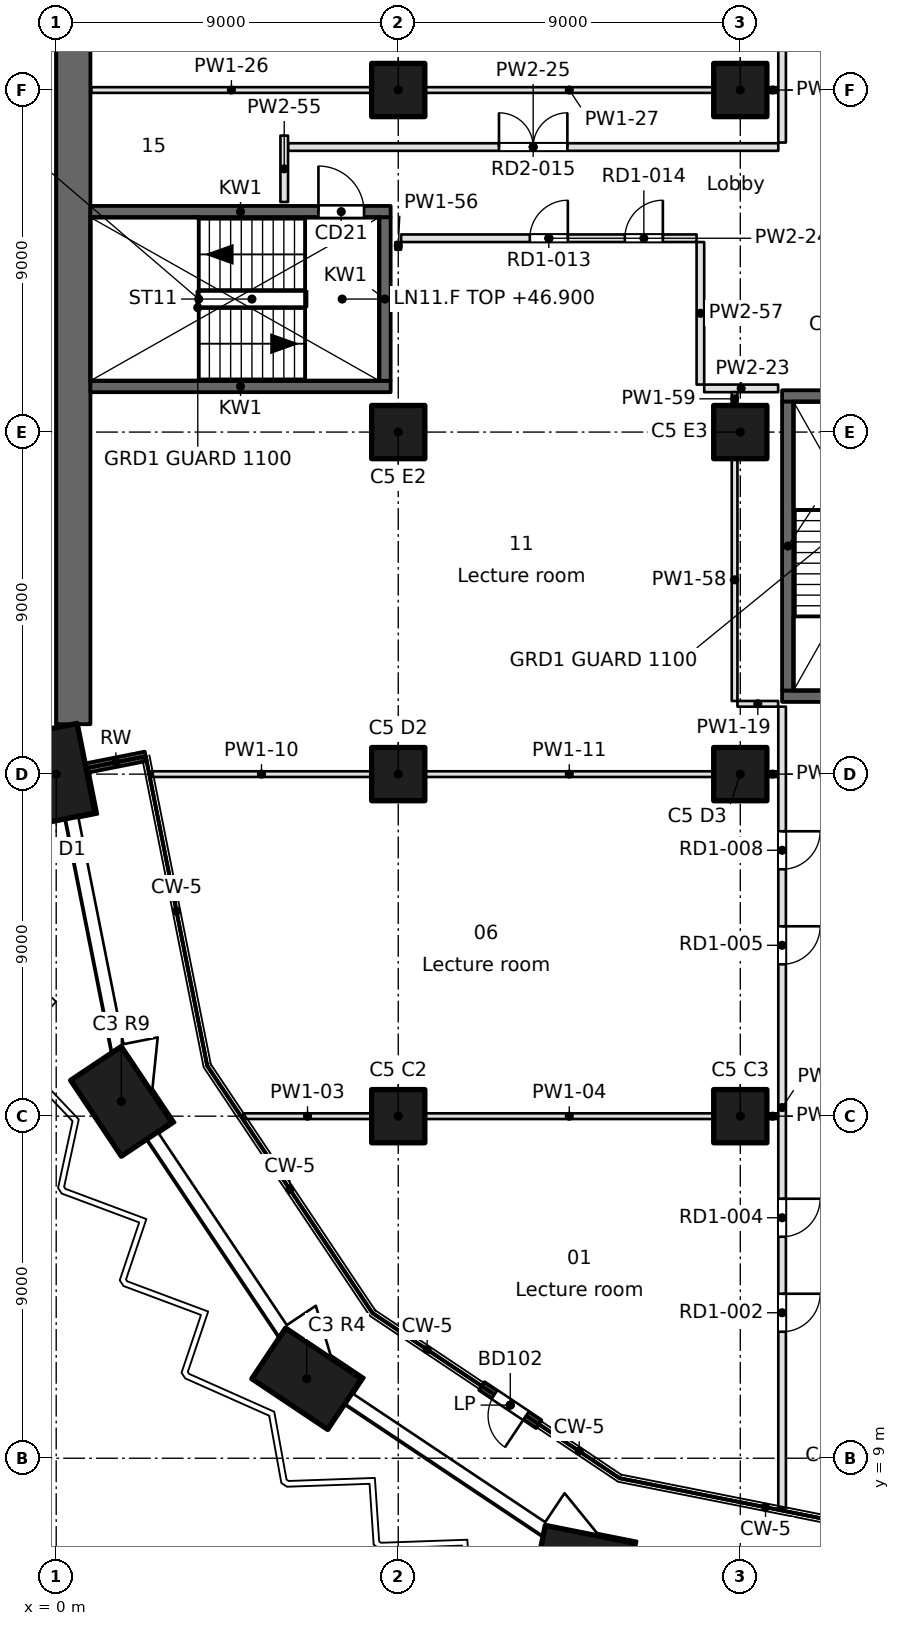
"""IFC4 building model, lengths in metres.
Left out: names, types, materials, properties, quantities, classifications, styles, units other than length and angle.
Written with IfcOpenShell. Run it as: python <this file> out.ifc"""

import sys

from ifc_helpers import new_model, si_unit, direction, frame, frame_2d, origin, origin_2d, place, context, subcontext, project, spatial, rectangle, extrude, element, fill, save


model = new_model("IFC4")
c1 = context("Model", 3, precision=1e-05, world=origin(), true_north=direction((0.0, 1.0)))
c2 = subcontext(c1, "Body", "Model", "MODEL_VIEW")
j1 = project(units=[si_unit("LENGTHUNIT", "METRE"), si_unit("PLANEANGLEUNIT", "RADIAN")], contexts=[c1])
p1 = place(None, origin())
s1 = spatial("IfcSite", under=j1, at=p1, CompositionType="ELEMENT")
p2 = place(p1, origin())
s2 = spatial("IfcBuilding", under=s1, at=p2, CompositionType="ELEMENT")
p3 = place(p2, frame((0.0, 0.0, 46.9)))
s3 = spatial("IfcBuildingStorey", under=s2, at=p3, CompositionType="ELEMENT", Elevation=46.9)
for number, where, z_axis, x_axis in (
    (1, (13.89, 6.213, 0.0), (0.0, 0.0, 1.0), (-0.981, 0.195, 0.0)),
    (2, (6.59, 11.09, 0.0), (0.0, 0.0, 1.0), (-0.831, 0.556, 0.0)),
    (3, (1.713, 18.39, 0.0), (0.0, 0.0, 1.0), (-0.556, 0.831, 0.0)),
    (4, (0.0, 27.0, 0.0), (0.0, 0.0, 1.0), (-0.195, 0.981, 0.0)),
):
    element("IfcColumn", number, at=place(p3, frame(where, z_axis=z_axis, x_axis=x_axis)), inside=s3, PredefinedType="COLUMN", context=c2, shape_type="SweptSolid", body=[
        extrude(rectangle(XDim=2.4, YDim=1.6, at=origin_2d()), origin(), (0.0, 0.0, 1.0), 3.7),
    ])
for number, where, z_axis, x_axis in (
    (5, (9.0, 18.0, 0.0), (0.0, 0.0, 1.0), (1.0, 0.0, 0.0)),
    (6, (9.0, 27.0, 0.0), (0.0, 0.0, 1.0), (1.0, 0.0, 0.0)),
    (7, (9.0, 36.0, 0.0), (0.0, 0.0, 1.0), (1.0, 0.0, 0.0)),
    (8, (9.0, 45.0, 0.0), (0.0, 0.0, 1.0), (1.0, 0.0, 0.0)),
    (9, (18.0, 18.0, 0.0), (0.0, 0.0, 1.0), (1.0, 0.0, 0.0)),
    (10, (18.0, 27.0, 0.0), (0.0, 0.0, 1.0), (1.0, 0.0, 0.0)),
    (11, (18.0, 36.0, 0.0), (0.0, 0.0, 1.0), (1.0, 0.0, 0.0)),
    (12, (18.0, 45.0, 0.0), (0.0, 0.0, 1.0), (1.0, 0.0, 0.0)),
):
    element("IfcColumn", number, at=place(p3, frame(where, z_axis=z_axis, x_axis=x_axis)), inside=s3, PredefinedType="COLUMN", context=c2, shape_type="SweptSolid", body=[
        extrude(rectangle(XDim=1.4, YDim=1.4, at=origin_2d()), origin(), (0.0, 0.0, 1.0), 3.7),
    ])
p4 = place(p3, frame((0.45, 94.5, 0.0), z_axis=(0.0, 0.0, 1.0), x_axis=(0.0, -1.0, 0.0)))
e13 = element("IfcWall", 13, at=p4, inside=s3, PredefinedType="SHEAR", context=c2, shape_type="SweptSolid", body=[
    extrude(rectangle(XDim=66.187, YDim=0.9, at=frame_2d((33.094, 0.0))), origin(), (0.0, 0.0, 1.0), 3.7),
])
p5 = place(p3, frame((0.784, 27.157, 0.0), z_axis=(0.0, 0.0, 1.0), x_axis=(0.980826234823, 0.19488431718, 0.0)))
e14 = element("IfcWall", 14, at=p5, inside=s3, PredefinedType="SOLIDWALL", context=c2, shape_type="SweptSolid", body=[
    extrude(rectangle(XDim=1.601, YDim=0.25, at=frame_2d((0.801, 0.0))), origin(), (0.0, 0.0, 1.0), 3.3),
])
p6 = place(p3, frame((11.2, 10.898, 0.0), z_axis=(0.0, 0.0, 1.0), x_axis=(0.83146554274, -0.555576323502, 0.0)))
e15 = element("IfcWall", 15, at=p6, inside=s3, PredefinedType="SOLIDWALL", context=c2, shape_type="SweptSolid", body=[
    extrude(rectangle(XDim=1.8, YDim=0.25, at=frame_2d((0.9, 0.0))), origin(), (0.0, 0.0, 1.0), 3.3),
])
p7 = place(p6, frame((0.4, 0.0, 0.0)))
e16 = element("IfcOpeningElement", 16, at=p7, cuts=e15, PredefinedType="OPENING", context=c2, shape_type="SweptSolid", body=[
    extrude(rectangle(XDim=1.0, YDim=2.1, at=frame_2d((0.5, 1.05))), frame((0.0, 0.125, 0.0), z_axis=(0.0, -1.0, 0.0), x_axis=(1.0, 0.0, 0.0)), (0.0, 0.0, 1.0), 0.25),
])
for number, where, z_axis, x_axis in (
    (17, (19.1, 29.05, -0.4), (0.0, 0.0, 1.0), (1.0, 0.0, 0.0)),
    (18, (19.1, 36.95, -0.4), (0.0, 0.0, 1.0), (1.0, 0.0, 0.0)),
):
    element("IfcWall", number, at=place(p3, frame(where, z_axis=z_axis, x_axis=x_axis)), inside=s3, PredefinedType="SOLIDWALL", context=c2, shape_type="SweptSolid", body=[
        extrude(rectangle(XDim=4.9, YDim=0.3, at=frame_2d((2.45, 0.0))), origin(), (0.0, 0.0, 1.0), 3.7),
    ])
p8 = place(p3, frame((0.9, 37.2, -0.4), z_axis=(0.0, 0.0, 1.0), x_axis=(1.0, 0.0, 0.0)))
e19 = element("IfcWall", 19, at=p8, inside=s3, PredefinedType="SOLIDWALL", context=c2, shape_type="SweptSolid", body=[
    extrude(rectangle(XDim=7.9, YDim=0.3, at=frame_2d((3.95, 0.0))), origin(), (0.0, 0.0, 1.0), 3.7),
])
p9 = place(p3, frame((0.9, 41.8, -0.4), z_axis=(0.0, 0.0, 1.0), x_axis=(1.0, 0.0, 0.0)))
e20 = element("IfcWall", 20, at=p9, inside=s3, PredefinedType="SOLIDWALL", context=c2, shape_type="SweptSolid", body=[
    extrude(rectangle(XDim=7.9, YDim=0.3, at=frame_2d((3.95, 0.0))), origin(), (0.0, 0.0, 1.0), 3.7),
])
p10 = place(p9, frame((6.0, 0.0, 0.4)))
e21 = element("IfcOpeningElement", 21, at=p10, cuts=e20, PredefinedType="OPENING", context=c2, shape_type="SweptSolid", body=[
    extrude(rectangle(XDim=1.2, YDim=2.1, at=frame_2d((0.6, 1.05))), frame((0.0, 0.15, 0.0), z_axis=(0.0, -1.0, 0.0), x_axis=(1.0, 0.0, 0.0)), (0.0, 0.0, 1.0), 0.3),
])
p11 = place(p3, frame((8.65, 37.35, -0.4), z_axis=(0.0, 0.0, 1.0), x_axis=(0.0, 1.0, 0.0)))
e22 = element("IfcWall", 22, at=p11, inside=s3, PredefinedType="SOLIDWALL", context=c2, shape_type="SweptSolid", body=[
    extrude(rectangle(XDim=4.3, YDim=0.3, at=frame_2d((2.15, 0.0))), origin(), (0.0, 0.0, 1.0), 3.7),
])
p12 = place(p3, frame((19.25, 29.2, -0.4), z_axis=(0.0, 0.0, 1.0), x_axis=(0.0, 1.0, 0.0)))
e23 = element("IfcWall", 23, at=p12, inside=s3, PredefinedType="SOLIDWALL", context=c2, shape_type="SweptSolid", body=[
    extrude(rectangle(XDim=7.6, YDim=0.3, at=frame_2d((3.8, 0.0))), origin(), (0.0, 0.0, 1.0), 3.7),
])
p13 = place(p3, frame((4.926, 18.0, 0.0), z_axis=(0.0, 0.0, 1.0), x_axis=(1.0, 0.0, 0.0)))
e24 = element("IfcWall", 24, at=p13, inside=s3, PredefinedType="PARTITIONING", context=c2, shape_type="SweptSolid", body=[
    extrude(rectangle(XDim=3.375, YDim=0.15, at=frame_2d((1.687, 0.0))), origin(), (0.0, 0.0, 1.0), 3.3),
])
p14 = place(p3, frame((9.7, 18.0, 0.0), z_axis=(0.0, 0.0, 1.0), x_axis=(1.0, 0.0, 0.0)))
e25 = element("IfcWall", 25, at=p14, inside=s3, PredefinedType="PARTITIONING", context=c2, shape_type="SweptSolid", body=[
    extrude(rectangle(XDim=7.6, YDim=0.15, at=frame_2d((3.8, 0.0))), origin(), (0.0, 0.0, 1.0), 3.3),
])
p15 = place(p3, frame((18.7, 18.0, 0.0), z_axis=(0.0, 0.0, 1.0), x_axis=(1.0, 0.0, 0.0)))
e26 = element("IfcWall", 26, at=p15, inside=s3, PredefinedType="PARTITIONING", context=c2, shape_type="SweptSolid", body=[
    extrude(rectangle(XDim=0.3, YDim=0.15, at=frame_2d((0.15, 0.0))), origin(), (0.0, 0.0, 1.0), 3.3),
])
p16 = place(p3, frame((2.503, 27.0, 0.0), z_axis=(0.0, 0.0, 1.0), x_axis=(1.0, 0.0, 0.0)))
e27 = element("IfcWall", 27, at=p16, inside=s3, PredefinedType="PARTITIONING", context=c2, shape_type="SweptSolid", body=[
    extrude(rectangle(XDim=5.797, YDim=0.15, at=frame_2d((2.898, 0.0))), origin(), (0.0, 0.0, 1.0), 3.3),
])
p17 = place(p3, frame((9.7, 27.0, 0.0), z_axis=(0.0, 0.0, 1.0), x_axis=(1.0, 0.0, 0.0)))
e28 = element("IfcWall", 28, at=p17, inside=s3, PredefinedType="PARTITIONING", context=c2, shape_type="SweptSolid", body=[
    extrude(rectangle(XDim=7.6, YDim=0.15, at=frame_2d((3.8, 0.0))), origin(), (0.0, 0.0, 1.0), 3.3),
])
p18 = place(p3, frame((18.7, 27.0, 0.0), z_axis=(0.0, 0.0, 1.0), x_axis=(1.0, 0.0, 0.0)))
e29 = element("IfcWall", 29, at=p18, inside=s3, PredefinedType="PARTITIONING", context=c2, shape_type="SweptSolid", body=[
    extrude(rectangle(XDim=0.3, YDim=0.15, at=frame_2d((0.15, 0.0))), origin(), (0.0, 0.0, 1.0), 3.3),
])
p19 = place(p3, frame((17.925, 28.85, 0.0), z_axis=(0.0, 0.0, 1.0), x_axis=(1.0, 0.0, 0.0)))
e30 = element("IfcWall", 30, at=p19, inside=s3, PredefinedType="PARTITIONING", context=c2, shape_type="SweptSolid", body=[
    extrude(rectangle(XDim=1.071, YDim=0.15, at=frame_2d((0.536, 0.0))), origin(), (0.0, 0.0, 1.0), 3.3),
])
p20 = place(p3, frame((18.996, 37.15, 0.0), z_axis=(0.0, 0.0, 1.0), x_axis=(-1.0, 0.0, 0.0)))
e31 = element("IfcWall", 31, at=p20, inside=s3, PredefinedType="PARTITIONING", context=c2, shape_type="SweptSolid", body=[
    extrude(rectangle(XDim=1.946, YDim=0.2, at=frame_2d((0.973, 0.0))), origin(), (0.0, 0.0, 1.0), 3.3),
])
p21 = place(p3, frame((16.85, 41.1, 0.0), z_axis=(0.0, 0.0, 1.0), x_axis=(-1.0, 0.0, 0.0)))
e32 = element("IfcWall", 32, at=p21, inside=s3, PredefinedType="PARTITIONING", context=c2, shape_type="SweptSolid", body=[
    extrude(rectangle(XDim=7.775, YDim=0.2, at=frame_2d((3.888, 0.0))), origin(), (0.0, 0.0, 1.0), 3.3),
])
p22 = place(p21, frame((3.387, 0.0, 0.0)))
e33 = element("IfcOpeningElement", 33, at=p22, cuts=e32, PredefinedType="OPENING", context=c2, shape_type="SweptSolid", body=[
    extrude(rectangle(XDim=1.0, YDim=2.1, at=frame_2d((0.5, 1.05))), frame((0.0, 0.1, 0.0), z_axis=(0.0, -1.0, 0.0), x_axis=(1.0, 0.0, 0.0)), (0.0, 0.0, 1.0), 0.2),
])
p23 = place(p21, frame((0.887, 0.0, 0.0)))
e34 = element("IfcOpeningElement", 34, at=p23, cuts=e32, PredefinedType="OPENING", context=c2, shape_type="SweptSolid", body=[
    extrude(rectangle(XDim=1.0, YDim=2.1, at=frame_2d((0.5, 1.05))), frame((0.0, 0.1, 0.0), z_axis=(0.0, -1.0, 0.0), x_axis=(1.0, 0.0, 0.0)), (0.0, 0.0, 1.0), 0.2),
])
p24 = place(p3, frame((6.1, 43.5, 0.0), z_axis=(0.0, 0.0, 1.0), x_axis=(1.0, 0.0, 0.0)))
e35 = element("IfcWall", 35, at=p24, inside=s3, PredefinedType="PARTITIONING", context=c2, shape_type="SweptSolid", body=[
    extrude(rectangle(XDim=12.9, YDim=0.2, at=frame_2d((6.45, 0.0))), origin(), (0.0, 0.0, 1.0), 3.3),
])
p25 = place(p24, frame((5.55, 0.0, 0.0)))
e36 = element("IfcOpeningElement", 36, at=p25, cuts=e35, PredefinedType="OPENING", context=c2, shape_type="SweptSolid", body=[
    extrude(rectangle(XDim=1.8, YDim=2.1, at=frame_2d((0.9, 1.05))), frame((0.0, 0.1, 0.0), z_axis=(0.0, -1.0, 0.0), x_axis=(1.0, 0.0, 0.0)), (0.0, 0.0, 1.0), 0.2),
])
p26 = place(p3, frame((0.92, 45.0, 0.0), z_axis=(0.0, 0.0, 1.0), x_axis=(1.0, 0.0, 0.0)))
e37 = element("IfcWall", 37, at=p26, inside=s3, PredefinedType="PARTITIONING", context=c2, shape_type="SweptSolid", body=[
    extrude(rectangle(XDim=7.38, YDim=0.15, at=frame_2d((3.69, 0.0))), origin(), (0.0, 0.0, 1.0), 3.3),
])
p27 = place(p3, frame((9.7, 45.0, 0.0), z_axis=(0.0, 0.0, 1.0), x_axis=(1.0, 0.0, 0.0)))
e38 = element("IfcWall", 38, at=p27, inside=s3, PredefinedType="PARTITIONING", context=c2, shape_type="SweptSolid", body=[
    extrude(rectangle(XDim=7.6, YDim=0.15, at=frame_2d((3.8, 0.0))), origin(), (0.0, 0.0, 1.0), 3.3),
])
p28 = place(p3, frame((18.7, 45.0, 0.0), z_axis=(0.0, 0.0, 1.0), x_axis=(1.0, 0.0, 0.0)))
e39 = element("IfcWall", 39, at=p28, inside=s3, PredefinedType="PARTITIONING", context=c2, shape_type="SweptSolid", body=[
    extrude(rectangle(XDim=0.3, YDim=0.15, at=frame_2d((0.15, 0.0))), origin(), (0.0, 0.0, 1.0), 3.3),
])
p29 = place(p3, frame((6.0, 42.054, 0.0), z_axis=(0.0, 0.0, 1.0), x_axis=(0.0, 1.0, 0.0)))
e40 = element("IfcWall", 40, at=p29, inside=s3, PredefinedType="PARTITIONING", context=c2, shape_type="SweptSolid", body=[
    extrude(rectangle(XDim=1.746, YDim=0.2, at=frame_2d((0.873, 0.0))), origin(), (0.0, 0.0, 1.0), 3.3),
])
p30 = place(p3, frame((9.0, 41.0, 0.0), z_axis=(0.0, 0.0, 1.0), x_axis=(0.0, -1.0, 0.0)))
e41 = element("IfcWall", 41, at=p30, inside=s3, PredefinedType="PARTITIONING", context=c2, shape_type="SweptSolid", body=[
    extrude(rectangle(XDim=0.2, YDim=0.15, at=frame_2d((0.1, 0.0))), origin(), (0.0, 0.0, 1.0), 3.3),
])
p31 = place(p3, frame((16.95, 37.25, 0.0), z_axis=(0.0, 0.0, 1.0), x_axis=(0.0, 1.0, 0.0)))
e42 = element("IfcWall", 42, at=p31, inside=s3, PredefinedType="PARTITIONING", context=c2, shape_type="SweptSolid", body=[
    extrude(rectangle(XDim=3.75, YDim=0.2, at=frame_2d((1.875, 0.0))), origin(), (0.0, 0.0, 1.0), 3.3),
])
p32 = place(p3, frame((17.85, 35.3, 0.0), z_axis=(0.0, 0.0, 1.0), x_axis=(0.0, -1.0, 0.0)))
e43 = element("IfcWall", 43, at=p32, inside=s3, PredefinedType="PARTITIONING", context=c2, shape_type="SweptSolid", body=[
    extrude(rectangle(XDim=6.375, YDim=0.15, at=frame_2d((3.188, 0.0))), origin(), (0.0, 0.0, 1.0), 3.3),
])
p33 = place(p3, frame((17.85, 37.05, 0.0), z_axis=(0.0, 0.0, 1.0), x_axis=(0.0, -1.0, 0.0)))
e44 = element("IfcWall", 44, at=p33, inside=s3, PredefinedType="PARTITIONING", context=c2, shape_type="SweptSolid", body=[
    extrude(rectangle(XDim=0.35, YDim=0.15, at=frame_2d((0.175, 0.0))), origin(), (0.0, 0.0, 1.0), 3.3),
])
p34 = place(p3, frame((19.1, 7.679, 0.0), z_axis=(0.0, 0.0, 1.0), x_axis=(0.0, 1.0, 0.0)))
e45 = element("IfcWall", 45, at=p34, inside=s3, PredefinedType="PARTITIONING", context=c2, shape_type="SweptSolid", body=[
    extrude(rectangle(XDim=21.095, YDim=0.2, at=frame_2d((10.548, 0.0))), origin(), (0.0, 0.0, 1.0), 3.3),
])
p35 = place(p34, frame((4.648, 0.0, 0.0)))
e46 = element("IfcOpeningElement", 46, at=p35, cuts=e45, PredefinedType="OPENING", context=c2, shape_type="SweptSolid", body=[
    extrude(rectangle(XDim=1.0, YDim=2.1, at=frame_2d((0.5, 1.05))), frame((0.0, 0.1, 0.0), z_axis=(0.0, -1.0, 0.0), x_axis=(1.0, 0.0, 0.0)), (0.0, 0.0, 1.0), 0.2),
])
p36 = place(p34, frame((7.148, 0.0, 0.0)))
e47 = element("IfcOpeningElement", 47, at=p36, cuts=e45, PredefinedType="OPENING", context=c2, shape_type="SweptSolid", body=[
    extrude(rectangle(XDim=1.0, YDim=2.1, at=frame_2d((0.5, 1.05))), frame((0.0, 0.1, 0.0), z_axis=(0.0, -1.0, 0.0), x_axis=(1.0, 0.0, 0.0)), (0.0, 0.0, 1.0), 0.2),
])
p37 = place(p34, frame((14.317, 0.0, 0.0)))
e48 = element("IfcOpeningElement", 48, at=p37, cuts=e45, PredefinedType="OPENING", context=c2, shape_type="SweptSolid", body=[
    extrude(rectangle(XDim=1.0, YDim=2.1, at=frame_2d((0.5, 1.05))), frame((0.0, 0.1, 0.0), z_axis=(0.0, -1.0, 0.0), x_axis=(1.0, 0.0, 0.0)), (0.0, 0.0, 1.0), 0.2),
])
p38 = place(p34, frame((16.817, 0.0, 0.0)))
e49 = element("IfcOpeningElement", 49, at=p38, cuts=e45, PredefinedType="OPENING", context=c2, shape_type="SweptSolid", body=[
    extrude(rectangle(XDim=1.0, YDim=2.1, at=frame_2d((0.5, 1.05))), frame((0.0, 0.1, 0.0), z_axis=(0.0, -1.0, 0.0), x_axis=(1.0, 0.0, 0.0)), (0.0, 0.0, 1.0), 0.2),
])
p39 = place(p3, frame((19.1, 43.618, 0.0), z_axis=(0.0, 0.0, 1.0), x_axis=(0.0, 1.0, 0.0)))
e50 = element("IfcWall", 50, at=p39, inside=s3, PredefinedType="PARTITIONING", context=c2, shape_type="SweptSolid", body=[
    extrude(rectangle(XDim=16.182, YDim=0.2, at=frame_2d((8.091, 0.0))), origin(), (0.0, 0.0, 1.0), 3.3),
])
p40 = place(p39, frame((5.723, 0.0, 0.0)))
e51 = element("IfcOpeningElement", 51, at=p40, cuts=e50, PredefinedType="OPENING", context=c2, shape_type="SweptSolid", body=[
    extrude(rectangle(XDim=1.0, YDim=2.1, at=frame_2d((0.5, 1.05))), frame((0.0, 0.1, 0.0), z_axis=(0.0, -1.0, 0.0), x_axis=(1.0, 0.0, 0.0)), (0.0, 0.0, 1.0), 0.2),
])
p41 = place(p39, frame((8.223, 0.0, 0.0)))
e52 = element("IfcOpeningElement", 52, at=p41, cuts=e50, PredefinedType="OPENING", context=c2, shape_type="SweptSolid", body=[
    extrude(rectangle(XDim=1.0, YDim=2.1, at=frame_2d((0.5, 1.05))), frame((0.0, 0.1, 0.0), z_axis=(0.0, -1.0, 0.0), x_axis=(1.0, 0.0, 0.0)), (0.0, 0.0, 1.0), 0.2),
])
p42 = place(p7, frame((1.0, 0.0, 0.0), z_axis=(0.0, 0.0, 1.0), x_axis=(-1.0, 0.0, 0.0)))
e53 = element("IfcDoor", 53, at=p42, inside=s3, OperationType="SINGLE_SWING_LEFT", PredefinedType="DOOR", context=c2, shape_type="SweptSolid", body=[
    extrude(rectangle(XDim=1.0, YDim=2.1, at=frame_2d((0.5, 1.05))), frame((0.0, 0.025, 0.0), z_axis=(0.0, -1.0, 0.0), x_axis=(1.0, 0.0, 0.0)), (0.0, 0.0, 1.0), 0.05),
])
fill(e16, e53)
p43 = place(p10, origin())
e54 = element("IfcDoor", 54, at=p43, inside=s3, OperationType="SINGLE_SWING_LEFT", PredefinedType="DOOR", context=c2, shape_type="SweptSolid", body=[
    extrude(rectangle(XDim=1.2, YDim=2.1, at=frame_2d((0.6, 1.05))), frame((0.0, 0.025, 0.0), z_axis=(0.0, -1.0, 0.0), x_axis=(1.0, 0.0, 0.0)), (0.0, 0.0, 1.0), 0.05),
])
fill(e21, e54)
p44 = place(p35, frame((1.0, 0.0, 0.0), z_axis=(0.0, 0.0, 1.0), x_axis=(-1.0, 0.0, 0.0)))
e55 = element("IfcDoor", 55, at=p44, inside=s3, OperationType="SINGLE_SWING_LEFT", PredefinedType="DOOR", context=c2, shape_type="SweptSolid", body=[
    extrude(rectangle(XDim=1.0, YDim=2.1, at=frame_2d((0.5, 1.05))), frame((0.0, 0.025, 0.0), z_axis=(0.0, -1.0, 0.0), x_axis=(1.0, 0.0, 0.0)), (0.0, 0.0, 1.0), 0.05),
])
fill(e46, e55)
p45 = place(p36, frame((1.0, 0.0, 0.0), z_axis=(0.0, 0.0, 1.0), x_axis=(-1.0, 0.0, 0.0)))
e56 = element("IfcDoor", 56, at=p45, inside=s3, OperationType="SINGLE_SWING_LEFT", PredefinedType="DOOR", context=c2, shape_type="SweptSolid", body=[
    extrude(rectangle(XDim=1.0, YDim=2.1, at=frame_2d((0.5, 1.05))), frame((0.0, 0.025, 0.0), z_axis=(0.0, -1.0, 0.0), x_axis=(1.0, 0.0, 0.0)), (0.0, 0.0, 1.0), 0.05),
])
fill(e47, e56)
p46 = place(p37, frame((1.0, 0.0, 0.0), z_axis=(0.0, 0.0, 1.0), x_axis=(-1.0, 0.0, 0.0)))
e57 = element("IfcDoor", 57, at=p46, inside=s3, OperationType="SINGLE_SWING_LEFT", PredefinedType="DOOR", context=c2, shape_type="SweptSolid", body=[
    extrude(rectangle(XDim=1.0, YDim=2.1, at=frame_2d((0.5, 1.05))), frame((0.0, 0.025, 0.0), z_axis=(0.0, -1.0, 0.0), x_axis=(1.0, 0.0, 0.0)), (0.0, 0.0, 1.0), 0.05),
])
fill(e48, e57)
p47 = place(p38, frame((1.0, 0.0, 0.0), z_axis=(0.0, 0.0, 1.0), x_axis=(-1.0, 0.0, 0.0)))
e58 = element("IfcDoor", 58, at=p47, inside=s3, OperationType="SINGLE_SWING_LEFT", PredefinedType="DOOR", context=c2, shape_type="SweptSolid", body=[
    extrude(rectangle(XDim=1.0, YDim=2.1, at=frame_2d((0.5, 1.05))), frame((0.0, 0.025, 0.0), z_axis=(0.0, -1.0, 0.0), x_axis=(1.0, 0.0, 0.0)), (0.0, 0.0, 1.0), 0.05),
])
fill(e49, e58)
p48 = place(p22, frame((1.0, 0.0, 0.0), z_axis=(0.0, 0.0, 1.0), x_axis=(-1.0, 0.0, 0.0)))
e59 = element("IfcDoor", 59, at=p48, inside=s3, OperationType="SINGLE_SWING_RIGHT", PredefinedType="DOOR", context=c2, shape_type="SweptSolid", body=[
    extrude(rectangle(XDim=1.0, YDim=2.1, at=frame_2d((0.5, 1.05))), frame((0.0, 0.025, 0.0), z_axis=(0.0, -1.0, 0.0), x_axis=(1.0, 0.0, 0.0)), (0.0, 0.0, 1.0), 0.05),
])
fill(e33, e59)
p49 = place(p23, frame((1.0, 0.0, 0.0), z_axis=(0.0, 0.0, 1.0), x_axis=(-1.0, 0.0, 0.0)))
e60 = element("IfcDoor", 60, at=p49, inside=s3, OperationType="SINGLE_SWING_RIGHT", PredefinedType="DOOR", context=c2, shape_type="SweptSolid", body=[
    extrude(rectangle(XDim=1.0, YDim=2.1, at=frame_2d((0.5, 1.05))), frame((0.0, 0.025, 0.0), z_axis=(0.0, -1.0, 0.0), x_axis=(1.0, 0.0, 0.0)), (0.0, 0.0, 1.0), 0.05),
])
fill(e34, e60)
p50 = place(p25, origin())
e61 = element("IfcDoor", 61, at=p50, inside=s3, OperationType="DOUBLE_DOOR_SINGLE_SWING", PredefinedType="DOOR", context=c2, shape_type="SweptSolid", body=[
    extrude(rectangle(XDim=1.8, YDim=2.1, at=frame_2d((0.9, 1.05))), frame((0.0, 0.025, 0.0), z_axis=(0.0, -1.0, 0.0), x_axis=(1.0, 0.0, 0.0)), (0.0, 0.0, 1.0), 0.05),
])
fill(e36, e61)
save(model, sys.argv[1])
